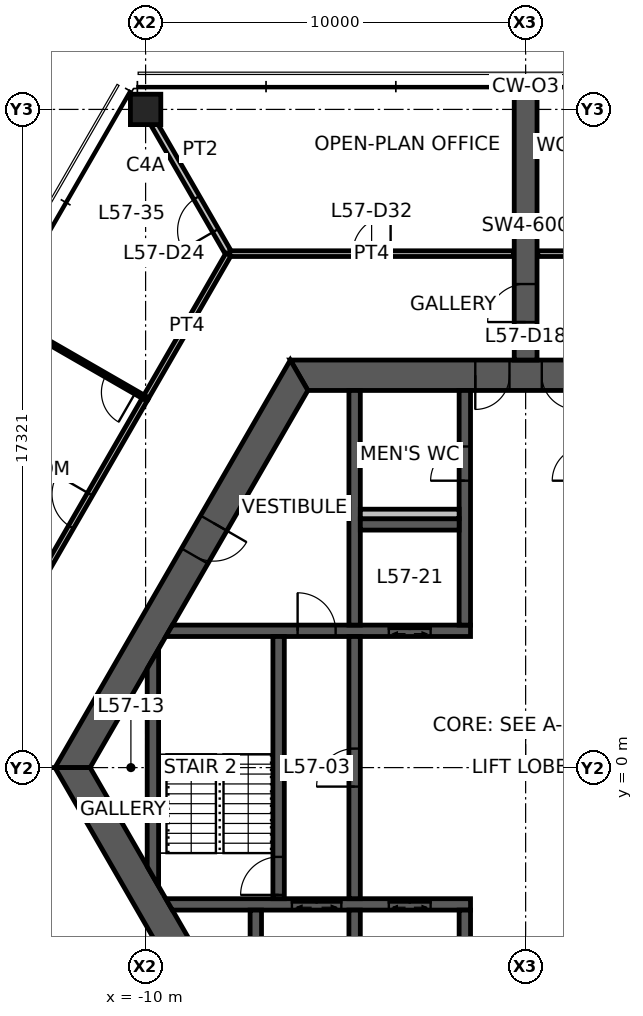
"""IFC4 building model, lengths in metres.
Left out: names, types, materials, properties, quantities, classifications, styles, units other than length and angle.
Written with IfcOpenShell. Run it as: python <this file> out.ifc"""

import sys

from ifc_helpers import new_model, si_unit, direction, frame, frame_2d, origin, origin_2d, place, context, subcontext, project, spatial, polyline, rectangle, hollow_rectangle, outline, extrude, element, fill, save


model = new_model("IFC4")
c1 = context("Model", 3, precision=1e-05, world=origin(), true_north=direction((0.0, 1.0)))
c2 = subcontext(c1, "Body", "Model", "MODEL_VIEW")
j1 = project(units=[si_unit("LENGTHUNIT", "METRE"), si_unit("PLANEANGLEUNIT", "RADIAN")], contexts=[c1])
p1 = place(None, origin())
s1 = spatial("IfcSite", under=j1, at=p1, CompositionType="ELEMENT")
p2 = place(p1, origin())
s2 = spatial("IfcBuilding", under=s1, at=p2, CompositionType="ELEMENT")
p3 = place(p2, frame((0.0, 0.0, 228.4)))
s3 = spatial("IfcBuildingStorey", under=s2, at=p3, CompositionType="ELEMENT", Elevation=228.4)
p4 = place(p3, frame((-10.0, 17.321, 0.0), z_axis=(0.0, 0.0, 1.0), x_axis=(1.0, 0.0, 0.0)))
e1 = element("IfcColumn", 1, at=p4, inside=s3, PredefinedType="COLUMN", context=c2, shape_type="SweptSolid", body=[
    extrude(hollow_rectangle(XDim=0.8, YDim=0.8, WallThickness=0.04, at=origin_2d()), origin(), (0.0, 0.0, 1.0), 3.9),
])
p5 = place(p3, frame((5.961, 10.325, 0.0), z_axis=(0.0, 0.0, 1.0), x_axis=(-1.0, 0.0, 0.0)))
e2 = element("IfcWall", 2, at=p5, inside=s3, PredefinedType="SHEAR", context=c2, shape_type="SweptSolid", body=[
    extrude(outline(polyline([(-0.231, -0.4), (4.636, -0.4), (5.536, -0.4), (6.386, -0.4), (7.286, -0.4), (12.153, -0.4), (11.691, 0.4), (7.286, 0.4), (6.386, 0.4), (5.536, 0.4), (4.636, 0.4), (0.231, 0.4), (-0.231, -0.4)])), origin(), (0.0, 0.0, 1.0), 3.9),
])
p6 = place(p5, frame((6.386, 0.0, 0.0)))
e3 = element("IfcOpeningElement", 3, at=p6, cuts=e2, PredefinedType="OPENING", context=c2, shape_type="SweptSolid", body=[
    extrude(rectangle(XDim=0.9, YDim=2.1, at=frame_2d((0.45, 1.05))), frame((0.0, 0.41, 0.0), z_axis=(0.0, -1.0, 0.0), x_axis=(1.0, 0.0, 0.0)), (0.0, 0.0, 1.0), 0.82),
])
p7 = place(p5, frame((4.636, 0.0, 0.0)))
e4 = element("IfcOpeningElement", 4, at=p7, cuts=e2, PredefinedType="OPENING", context=c2, shape_type="SweptSolid", body=[
    extrude(rectangle(XDim=0.9, YDim=2.1, at=frame_2d((0.45, 1.05))), frame((0.0, 0.41, 0.0), z_axis=(0.0, -1.0, 0.0), x_axis=(1.0, 0.0, 0.0)), (0.0, 0.0, 1.0), 0.82),
])
p8 = place(p3, frame((-5.961, 10.325, 0.0), z_axis=(0.0, 0.0, 1.0), x_axis=(-0.500004296715, -0.866022923061, 0.0)))
e5 = element("IfcWall", 5, at=p8, inside=s3, PredefinedType="SHEAR", context=c2, shape_type="SweptSolid", body=[
    extrude(outline(polyline([(-0.231, -0.4), (4.494, -0.4), (5.494, -0.4), (12.153, -0.4), (11.691, 0.4), (5.494, 0.4), (4.494, 0.4), (0.231, 0.4), (-0.231, -0.4)])), origin(), (0.0, 0.0, 1.0), 3.9),
])
p9 = place(p8, frame((4.494, 0.0, 0.0)))
e6 = element("IfcOpeningElement", 6, at=p9, cuts=e5, PredefinedType="OPENING", context=c2, shape_type="SweptSolid", body=[
    extrude(rectangle(XDim=1.0, YDim=2.1, at=frame_2d((0.5, 1.05))), frame((0.0, 0.41, 0.0), z_axis=(0.0, -1.0, 0.0), x_axis=(1.0, 0.0, 0.0)), (0.0, 0.0, 1.0), 0.82),
])
p10 = place(p3, frame((-11.922, 0.0, 0.0), z_axis=(0.0, 0.0, 1.0), x_axis=(0.500004296715, -0.866022923061, 0.0)))
e7 = element("IfcWall", 7, at=p10, inside=s3, PredefinedType="SHEAR", context=c2, shape_type="SweptSolid", body=[
    extrude(outline(polyline([(-0.231, -0.4), (6.281, -0.4), (7.081, -0.4), (12.153, -0.4), (11.691, 0.4), (7.081, 0.4), (6.281, 0.4), (0.231, 0.4), (-0.231, -0.4)])), origin(), (0.0, 0.0, 1.0), 3.9),
])
p11 = place(p10, frame((6.281, 0.0, 0.0)))
e8 = element("IfcOpeningElement", 8, at=p11, cuts=e7, PredefinedType="OPENING", context=c2, shape_type="SweptSolid", body=[
    extrude(rectangle(XDim=0.8, YDim=2.1, at=frame_2d((0.4, 1.05))), frame((0.0, 0.41, 0.0), z_axis=(0.0, -1.0, 0.0), x_axis=(1.0, 0.0, 0.0)), (0.0, 0.0, 1.0), 0.82),
])
p12 = place(p3, frame((0.0, 10.725, 0.0), z_axis=(0.0, 0.0, 1.0), x_axis=(0.0, 1.0, 0.0)))
e9 = element("IfcWall", 9, at=p12, inside=s3, PredefinedType="SHEAR", context=c2, shape_type="SweptSolid", body=[
    extrude(rectangle(XDim=7.045, YDim=0.6, at=frame_2d((3.523, 0.0))), origin(), (0.0, 0.0, 1.0), 3.9),
])
p13 = place(p12, frame((1.0, 0.0, 0.0)))
e10 = element("IfcOpeningElement", 10, at=p13, cuts=e9, PredefinedType="OPENING", context=c2, shape_type="SweptSolid", body=[
    extrude(rectangle(XDim=1.0, YDim=2.1, at=frame_2d((0.5, 1.05))), frame((0.0, 0.31, 0.0), z_axis=(0.0, -1.0, 0.0), x_axis=(1.0, 0.0, 0.0)), (0.0, 0.0, 1.0), 0.62),
])
p14 = place(p3, frame((-9.382, 3.6, 0.0), z_axis=(0.0, 0.0, 1.0), x_axis=(1.0, 0.0, 0.0)))
e11 = element("IfcWall", 11, at=p14, inside=s3, PredefinedType="SHEAR", context=c2, shape_type="SweptSolid", body=[
    extrude(outline(polyline([(-0.087, -0.15), (3.382, -0.15), (4.382, -0.15), (5.782, -0.15), (6.882, -0.15), (7.932, -0.15), (7.932, 0.15), (6.882, 0.15), (5.782, 0.15), (4.382, 0.15), (3.382, 0.15), (0.087, 0.15), (-0.087, -0.15)])), origin(), (0.0, 0.0, 1.0), 3.9),
])
p15 = place(p14, frame((3.382, 0.0, 0.0)))
e12 = element("IfcOpeningElement", 12, at=p15, cuts=e11, PredefinedType="OPENING", context=c2, shape_type="SweptSolid", body=[
    extrude(rectangle(XDim=1.0, YDim=2.1, at=frame_2d((0.5, 1.05))), frame((0.0, 0.16, 0.0), z_axis=(0.0, -1.0, 0.0), x_axis=(1.0, 0.0, 0.0)), (0.0, 0.0, 1.0), 0.32),
])
p16 = place(p14, frame((5.782, 0.0, 0.0)))
e13 = element("IfcOpeningElement", 13, at=p16, cuts=e11, PredefinedType="OPENING", context=c2, shape_type="SweptSolid", body=[
    extrude(rectangle(XDim=1.1, YDim=2.1, at=frame_2d((0.55, 1.05))), frame((0.0, 0.16, 0.0), z_axis=(0.0, -1.0, 0.0), x_axis=(1.0, 0.0, 0.0)), (0.0, 0.0, 1.0), 0.32),
])
p17 = place(p3, frame((-9.382, -3.6, 0.0), z_axis=(0.0, 0.0, 1.0), x_axis=(1.0, 0.0, 0.0)))
e14 = element("IfcWall", 14, at=p17, inside=s3, PredefinedType="SHEAR", context=c2, shape_type="SweptSolid", body=[
    extrude(outline(polyline([(0.087, -0.15), (3.232, -0.15), (4.532, -0.15), (5.782, -0.15), (6.882, -0.15), (7.932, -0.15), (7.932, 0.15), (6.882, 0.15), (5.782, 0.15), (4.532, 0.15), (3.232, 0.15), (-0.087, 0.15), (0.087, -0.15)])), origin(), (0.0, 0.0, 1.0), 3.9),
])
p18 = place(p17, frame((5.782, 0.0, 0.0)))
e15 = element("IfcOpeningElement", 15, at=p18, cuts=e14, PredefinedType="OPENING", context=c2, shape_type="SweptSolid", body=[
    extrude(rectangle(XDim=1.1, YDim=2.1, at=frame_2d((0.55, 1.05))), frame((0.0, 0.16, 0.0), z_axis=(0.0, -1.0, 0.0), x_axis=(1.0, 0.0, 0.0)), (0.0, 0.0, 1.0), 0.32),
])
p19 = place(p17, frame((3.232, 0.0, 0.0)))
e16 = element("IfcOpeningElement", 16, at=p19, cuts=e14, PredefinedType="OPENING", context=c2, shape_type="SweptSolid", body=[
    extrude(rectangle(XDim=1.3, YDim=2.1, at=frame_2d((0.65, 1.05))), frame((0.0, 0.16, 0.0), z_axis=(0.0, -1.0, 0.0), x_axis=(1.0, 0.0, 0.0)), (0.0, 0.0, 1.0), 0.32),
])
p20 = place(p3, frame((-1.6, 3.75, 0.0), z_axis=(0.0, 0.0, 1.0), x_axis=(0.0, 1.0, 0.0)))
e17 = element("IfcWall", 17, at=p20, inside=s3, PredefinedType="SHEAR", context=c2, shape_type="SweptSolid", body=[
    extrude(rectangle(XDim=6.175, YDim=0.3, at=frame_2d((3.087, 0.0))), origin(), (0.0, 0.0, 1.0), 3.9),
])
p21 = place(p20, frame((3.8, 0.0, 0.0)))
e18 = element("IfcOpeningElement", 18, at=p21, cuts=e17, PredefinedType="OPENING", context=c2, shape_type="SweptSolid", body=[
    extrude(rectangle(XDim=0.9, YDim=2.1, at=frame_2d((0.45, 1.05))), frame((0.0, 0.16, 0.0), z_axis=(0.0, -1.0, 0.0), x_axis=(1.0, 0.0, 0.0)), (0.0, 0.0, 1.0), 0.32),
])
p22 = place(p3, frame((-1.6, -3.75, 0.0), z_axis=(0.0, 0.0, 1.0), x_axis=(0.0, -1.0, 0.0)))
e19 = element("IfcWall", 19, at=p22, inside=s3, PredefinedType="SHEAR", context=c2, shape_type="SweptSolid", body=[
    extrude(rectangle(XDim=6.175, YDim=0.3, at=frame_2d((3.087, 0.0))), origin(), (0.0, 0.0, 1.0), 3.9),
])
p23 = place(p22, frame((3.8, 0.0, 0.0)))
e20 = element("IfcOpeningElement", 20, at=p23, cuts=e19, PredefinedType="OPENING", context=c2, shape_type="SweptSolid", body=[
    extrude(rectangle(XDim=0.9, YDim=2.1, at=frame_2d((0.45, 1.05))), frame((0.0, 0.16, 0.0), z_axis=(0.0, -1.0, 0.0), x_axis=(1.0, 0.0, 0.0)), (0.0, 0.0, 1.0), 0.32),
])
p24 = place(p3, frame((-4.5, -3.45, 0.0), z_axis=(0.0, 0.0, 1.0), x_axis=(0.0, 1.0, 0.0)))
e21 = element("IfcWall", 21, at=p24, inside=s3, PredefinedType="SHEAR", context=c2, shape_type="SweptSolid", body=[
    extrude(rectangle(XDim=6.9, YDim=0.3, at=frame_2d((3.45, 0.0))), origin(), (0.0, 0.0, 1.0), 3.9),
])
p25 = place(p24, frame((2.95, 0.0, 0.0)))
e22 = element("IfcOpeningElement", 22, at=p25, cuts=e21, PredefinedType="OPENING", context=c2, shape_type="SweptSolid", body=[
    extrude(rectangle(XDim=1.0, YDim=2.1, at=frame_2d((0.5, 1.05))), frame((0.0, 0.16, 0.0), z_axis=(0.0, -1.0, 0.0), x_axis=(1.0, 0.0, 0.0)), (0.0, 0.0, 1.0), 0.32),
])
p26 = place(p3, frame((-6.5, -3.45, 0.0), z_axis=(0.0, 0.0, 1.0), x_axis=(0.0, 1.0, 0.0)))
e23 = element("IfcWall", 23, at=p26, inside=s3, PredefinedType="SHEAR", context=c2, shape_type="SweptSolid", body=[
    extrude(rectangle(XDim=6.9, YDim=0.3, at=frame_2d((3.45, 0.0))), origin(), (0.0, 0.0, 1.0), 3.9),
])
p27 = place(p26, frame((0.1, 0.0, 0.0)))
e24 = element("IfcOpeningElement", 24, at=p27, cuts=e23, PredefinedType="OPENING", context=c2, shape_type="SweptSolid", body=[
    extrude(rectangle(XDim=1.0, YDim=2.1, at=frame_2d((0.5, 1.05))), frame((0.0, 0.16, 0.0), z_axis=(0.0, -1.0, 0.0), x_axis=(1.0, 0.0, 0.0)), (0.0, 0.0, 1.0), 0.32),
])
for number, where, z_axis, x_axis in (
    (25, (-4.5, 3.75, 0.0), (0.0, 0.0, 1.0), (0.0, 1.0, 0.0)),
    (26, (-4.5, -3.75, 0.0), (0.0, 0.0, 1.0), (0.0, -1.0, 0.0)),
):
    element("IfcWall", number, at=place(p3, frame(where, z_axis=z_axis, x_axis=x_axis)), inside=s3, PredefinedType="SHEAR", context=c2, shape_type="SweptSolid", body=[
        extrude(rectangle(XDim=6.175, YDim=0.3, at=frame_2d((3.087, 0.0))), origin(), (0.0, 0.0, 1.0), 3.9),
    ])
p28 = place(p3, frame((-4.35, 6.4, 0.0), z_axis=(0.0, 0.0, 1.0), x_axis=(1.0, 0.0, 0.0)))
e27 = element("IfcWall", 27, at=p28, inside=s3, PredefinedType="SHEAR", context=c2, shape_type="SweptSolid", body=[
    extrude(rectangle(XDim=2.6, YDim=0.3, at=frame_2d((1.3, 0.0))), origin(), (0.0, 0.0, 1.0), 3.9),
])
p29 = place(p3, frame((-7.1, -3.75, 0.0), z_axis=(0.0, 0.0, 1.0), x_axis=(0.0, -1.0, 0.0)))
e28 = element("IfcWall", 28, at=p29, inside=s3, PredefinedType="SHEAR", context=c2, shape_type="SweptSolid", body=[
    extrude(rectangle(XDim=3.1, YDim=0.3, at=frame_2d((1.55, 0.0))), origin(), (0.0, 0.0, 1.0), 3.9),
])
p30 = place(p3, frame((-9.808, -2.862, 0.0), z_axis=(0.0, 0.0, 1.0), x_axis=(0.0, 1.0, 0.0)))
e29 = element("IfcWall", 29, at=p30, inside=s3, PredefinedType="SHEAR", context=c2, shape_type="SweptSolid", body=[
    extrude(outline(polyline([(-0.26, -0.15), (5.984, -0.15), (5.465, 0.15), (0.26, 0.15), (-0.26, -0.15)])), origin(), (0.0, 0.0, 1.0), 3.9),
])
p31 = place(p3, frame((-4.35, 6.675, 0.0), z_axis=(0.0, 0.0, 1.0), x_axis=(1.0, 0.0, 0.0)))
e30 = element("IfcWall", 30, at=p31, inside=s3, PredefinedType="PLUMBINGWALL", context=c2, shape_type="SweptSolid", body=[
    extrude(rectangle(XDim=2.6, YDim=0.25, at=frame_2d((1.3, 0.0))), origin(), (0.0, 0.0, 1.0), 3.9),
])
p32 = place(p3, frame((-7.809, 13.525, 0.0), z_axis=(0.0, 0.0, 1.0), x_axis=(-0.499997299682, 0.866026962808, 0.0)))
e31 = element("IfcWall", 31, at=p32, inside=s3, PredefinedType="PARTITIONING", context=c2, shape_type="SweptSolid", body=[
    extrude(rectangle(XDim=4.383, YDim=0.175, at=frame_2d((2.191, 0.0))), origin(), (0.0, 0.0, 1.0), 3.05),
])
p33 = place(p32, frame((0.7, 0.0, 0.0)))
e32 = element("IfcOpeningElement", 32, at=p33, cuts=e31, PredefinedType="OPENING", context=c2, shape_type="SweptSolid", body=[
    extrude(rectangle(XDim=1.0, YDim=2.1, at=frame_2d((0.5, 1.05))), frame((0.0, 0.098, 0.0), z_axis=(0.0, -1.0, 0.0), x_axis=(1.0, 0.0, 0.0)), (0.0, 0.0, 1.0), 0.195),
])
p34 = place(p3, frame((0.32, 13.525, 0.0), z_axis=(0.0, 0.0, 1.0), x_axis=(1.0, 0.0, 0.0)))
e33 = element("IfcWall", 33, at=p34, inside=s3, PredefinedType="PARTITIONING", context=c2, shape_type="SweptSolid", body=[
    extrude(rectangle(XDim=4.15, YDim=0.15, at=frame_2d((2.075, 0.0))), origin(), (0.0, 0.0, 1.0), 2.95),
])
p35 = place(p34, frame((1.575, 0.0, 0.0)))
e34 = element("IfcOpeningElement", 34, at=p35, cuts=e33, PredefinedType="OPENING", context=c2, shape_type="SweptSolid", body=[
    extrude(rectangle(XDim=1.0, YDim=2.1, at=frame_2d((0.5, 1.05))), frame((0.0, 0.085, 0.0), z_axis=(0.0, -1.0, 0.0), x_axis=(1.0, 0.0, 0.0)), (0.0, 0.0, 1.0), 0.17),
])
p36 = place(p3, frame((-7.786, 13.525, 0.0), z_axis=(0.0, 0.0, 1.0), x_axis=(1.0, 0.0, 0.0)))
e35 = element("IfcWall", 35, at=p36, inside=s3, PredefinedType="PARTITIONING", context=c2, shape_type="SweptSolid", body=[
    extrude(rectangle(XDim=7.466, YDim=0.15, at=frame_2d((3.733, 0.0))), origin(), (0.0, 0.0, 1.0), 2.95),
])
p37 = place(p36, frame((3.233, 0.0, 0.0)))
e36 = element("IfcOpeningElement", 36, at=p37, cuts=e35, PredefinedType="OPENING", context=c2, shape_type="SweptSolid", body=[
    extrude(rectangle(XDim=1.0, YDim=2.1, at=frame_2d((0.5, 1.05))), frame((0.0, 0.085, 0.0), z_axis=(0.0, -1.0, 0.0), x_axis=(1.0, 0.0, 0.0)), (0.0, 0.0, 1.0), 0.17),
])
p38 = place(p3, frame((-10.008, 9.716, 0.0), z_axis=(0.0, 0.0, 1.0), x_axis=(0.500004234368, 0.866022959057, 0.0)))
e37 = element("IfcWall", 37, at=p38, inside=s3, PredefinedType="PARTITIONING", context=c2, shape_type="SweptSolid", body=[
    extrude(rectangle(XDim=4.375, YDim=0.15, at=frame_2d((2.188, 0.0))), origin(), (0.0, 0.0, 1.0), 2.95),
])
p39 = place(p3, frame((-11.873, -6.485, 0.0), z_axis=(0.0, 0.0, 1.0), x_axis=(-0.499958760481, 0.866049212123, 0.0)))
e38 = element("IfcWall", 38, at=p39, inside=s3, PredefinedType="PARTITIONING", context=c2, shape_type="SweptSolid", body=[
    extrude(rectangle(XDim=3.1, YDim=0.15, at=frame_2d((1.55, 0.0))), origin(), (0.0, 0.0, 1.0), 2.95),
])
p40 = place(p3, frame((-13.423, 3.801, 0.0), z_axis=(0.0, 0.0, 1.0), x_axis=(0.500020088259, 0.866013805512, 0.0)))
e39 = element("IfcWall", 39, at=p40, inside=s3, PredefinedType="PARTITIONING", context=c2, shape_type="SweptSolid", body=[
    extrude(rectangle(XDim=6.84, YDim=0.15, at=frame_2d((3.42, 0.0))), origin(), (0.0, 0.0, 1.0), 2.95),
])
p41 = place(p40, frame((2.92, 0.0, 0.0)))
e40 = element("IfcOpeningElement", 40, at=p41, cuts=e39, PredefinedType="OPENING", context=c2, shape_type="SweptSolid", body=[
    extrude(rectangle(XDim=1.0, YDim=2.1, at=frame_2d((0.5, 1.05))), frame((0.0, 0.085, 0.0), z_axis=(0.0, -1.0, 0.0), x_axis=(1.0, 0.0, 0.0)), (0.0, 0.0, 1.0), 0.17),
])
p42 = place(p3, frame((-10.003, 9.724, 0.0), z_axis=(0.0, 0.0, 1.0), x_axis=(-0.866566724083, 0.499061231426, 0.0)))
e41 = element("IfcWall", 41, at=p42, inside=s3, PredefinedType="PARTITIONING", context=c2, shape_type="SweptSolid", body=[
    extrude(rectangle(XDim=4.305, YDim=0.1, at=frame_2d((2.153, 0.0))), origin(), (0.0, 0.0, 1.0), 2.95),
])
p43 = place(p42, frame((0.3, 0.0, 0.0)))
e42 = element("IfcOpeningElement", 42, at=p43, cuts=e41, PredefinedType="OPENING", context=c2, shape_type="SweptSolid", body=[
    extrude(rectangle(XDim=0.9, YDim=2.1, at=frame_2d((0.45, 1.05))), frame((0.0, 0.06, 0.0), z_axis=(0.0, -1.0, 0.0), x_axis=(1.0, 0.0, 0.0)), (0.0, 0.0, 1.0), 0.12),
])
p44 = place(p3, frame((0.0, 17.771, 0.0), z_axis=(0.0, 0.0, 1.0), x_axis=(0.0, 1.0, 0.0)))
e43 = element("IfcWall", 43, at=p44, inside=s3, PredefinedType="PARTITIONING", context=c2, shape_type="SweptSolid", body=[
    extrude(rectangle(XDim=0.085, YDim=0.175, at=frame_2d((0.042, 0.0))), origin(), (0.0, 0.0, 1.0), 3.9),
])
p45 = place(p6, origin())
e44 = element("IfcDoor", 44, at=p45, inside=s3, OperationType="SINGLE_SWING_RIGHT", PredefinedType="DOOR", context=c2, shape_type="SweptSolid", body=[
    extrude(rectangle(XDim=0.9, YDim=2.1, at=frame_2d((0.45, 1.05))), frame((0.0, 0.025, 0.0), z_axis=(0.0, -1.0, 0.0), x_axis=(1.0, 0.0, 0.0)), (0.0, 0.0, 1.0), 0.05),
])
fill(e3, e44)
p46 = place(p7, origin())
e45 = element("IfcDoor", 45, at=p46, inside=s3, OperationType="SINGLE_SWING_LEFT", PredefinedType="DOOR", context=c2, shape_type="SweptSolid", body=[
    extrude(rectangle(XDim=0.9, YDim=2.1, at=frame_2d((0.45, 1.05))), frame((0.0, 0.025, 0.0), z_axis=(0.0, -1.0, 0.0), x_axis=(1.0, 0.0, 0.0)), (0.0, 0.0, 1.0), 0.05),
])
fill(e4, e45)
p47 = place(p9, origin())
e46 = element("IfcDoor", 46, at=p47, inside=s3, OperationType="SINGLE_SWING_LEFT", PredefinedType="DOOR", context=c2, shape_type="SweptSolid", body=[
    extrude(rectangle(XDim=1.0, YDim=2.1, at=frame_2d((0.5, 1.05))), frame((0.0, 0.025, 0.0), z_axis=(0.0, -1.0, 0.0), x_axis=(1.0, 0.0, 0.0)), (0.0, 0.0, 1.0), 0.05),
])
fill(e6, e46)
p48 = place(p25, origin())
e47 = element("IfcDoor", 47, at=p48, inside=s3, OperationType="SINGLE_SWING_LEFT", PredefinedType="DOOR", context=c2, shape_type="SweptSolid", body=[
    extrude(rectangle(XDim=1.0, YDim=2.1, at=frame_2d((0.5, 1.05))), frame((0.0, 0.025, 0.0), z_axis=(0.0, -1.0, 0.0), x_axis=(1.0, 0.0, 0.0)), (0.0, 0.0, 1.0), 0.05),
])
fill(e22, e47)
p49 = place(p27, origin())
e48 = element("IfcDoor", 48, at=p49, inside=s3, OperationType="SINGLE_SWING_LEFT", PredefinedType="DOOR", context=c2, shape_type="SweptSolid", body=[
    extrude(rectangle(XDim=1.0, YDim=2.1, at=frame_2d((0.5, 1.05))), frame((0.0, 0.025, 0.0), z_axis=(0.0, -1.0, 0.0), x_axis=(1.0, 0.0, 0.0)), (0.0, 0.0, 1.0), 0.05),
])
fill(e24, e48)
p50 = place(p15, origin())
e49 = element("IfcDoor", 49, at=p50, inside=s3, OperationType="SINGLE_SWING_LEFT", PredefinedType="DOOR", context=c2, shape_type="SweptSolid", body=[
    extrude(rectangle(XDim=1.0, YDim=2.1, at=frame_2d((0.5, 1.05))), frame((0.0, 0.025, 0.0), z_axis=(0.0, -1.0, 0.0), x_axis=(1.0, 0.0, 0.0)), (0.0, 0.0, 1.0), 0.05),
])
fill(e12, e49)
p51 = place(p21, origin())
e50 = element("IfcDoor", 50, at=p51, inside=s3, OperationType="SINGLE_SWING_LEFT", PredefinedType="DOOR", context=c2, shape_type="SweptSolid", body=[
    extrude(rectangle(XDim=0.9, YDim=2.1, at=frame_2d((0.45, 1.05))), frame((0.0, 0.025, 0.0), z_axis=(0.0, -1.0, 0.0), x_axis=(1.0, 0.0, 0.0)), (0.0, 0.0, 1.0), 0.05),
])
fill(e18, e50)
p52 = place(p13, origin())
e51 = element("IfcDoor", 51, at=p52, inside=s3, OperationType="SINGLE_SWING_LEFT", PredefinedType="DOOR", context=c2, shape_type="SweptSolid", body=[
    extrude(rectangle(XDim=1.0, YDim=2.1, at=frame_2d((0.5, 1.05))), frame((0.0, 0.025, 0.0), z_axis=(0.0, -1.0, 0.0), x_axis=(1.0, 0.0, 0.0)), (0.0, 0.0, 1.0), 0.05),
])
fill(e10, e51)
p53 = place(p33, origin())
e52 = element("IfcDoor", 52, at=p53, inside=s3, OperationType="SINGLE_SWING_LEFT", PredefinedType="DOOR", context=c2, shape_type="SweptSolid", body=[
    extrude(rectangle(XDim=1.0, YDim=2.1, at=frame_2d((0.5, 1.05))), frame((0.0, 0.025, 0.0), z_axis=(0.0, -1.0, 0.0), x_axis=(1.0, 0.0, 0.0)), (0.0, 0.0, 1.0), 0.05),
])
fill(e32, e52)
p54 = place(p37, origin())
e53 = element("IfcDoor", 53, at=p54, inside=s3, OperationType="SINGLE_SWING_RIGHT", PredefinedType="DOOR", context=c2, shape_type="SweptSolid", body=[
    extrude(rectangle(XDim=1.0, YDim=2.1, at=frame_2d((0.5, 1.05))), frame((0.0, 0.025, 0.0), z_axis=(0.0, -1.0, 0.0), x_axis=(1.0, 0.0, 0.0)), (0.0, 0.0, 1.0), 0.05),
])
fill(e36, e53)
p55 = place(p41, origin())
e54 = element("IfcDoor", 54, at=p55, inside=s3, OperationType="SINGLE_SWING_RIGHT", PredefinedType="DOOR", context=c2, shape_type="SweptSolid", body=[
    extrude(rectangle(XDim=1.0, YDim=2.1, at=frame_2d((0.5, 1.05))), frame((0.0, 0.025, 0.0), z_axis=(0.0, -1.0, 0.0), x_axis=(1.0, 0.0, 0.0)), (0.0, 0.0, 1.0), 0.05),
])
fill(e40, e54)
p56 = place(p43, origin())
e55 = element("IfcDoor", 55, at=p56, inside=s3, OperationType="SINGLE_SWING_LEFT", PredefinedType="DOOR", context=c2, shape_type="SweptSolid", body=[
    extrude(rectangle(XDim=0.9, YDim=2.1, at=frame_2d((0.45, 1.05))), frame((0.0, 0.025, 0.0), z_axis=(0.0, -1.0, 0.0), x_axis=(1.0, 0.0, 0.0)), (0.0, 0.0, 1.0), 0.05),
])
fill(e42, e55)
p57 = place(p16, origin())
e56 = element("IfcDoor", 56, at=p57, inside=s3, OperationType="DOUBLE_DOOR_SLIDING", PredefinedType="DOOR", context=c2, shape_type="SweptSolid", body=[
    extrude(rectangle(XDim=1.1, YDim=2.1, at=frame_2d((0.55, 1.05))), frame((0.0, 0.025, 0.0), z_axis=(0.0, -1.0, 0.0), x_axis=(1.0, 0.0, 0.0)), (0.0, 0.0, 1.0), 0.05),
])
fill(e13, e56)
p58 = place(p18, origin())
e57 = element("IfcDoor", 57, at=p58, inside=s3, OperationType="DOUBLE_DOOR_SLIDING", PredefinedType="DOOR", context=c2, shape_type="SweptSolid", body=[
    extrude(rectangle(XDim=1.1, YDim=2.1, at=frame_2d((0.55, 1.05))), frame((0.0, 0.025, 0.0), z_axis=(0.0, -1.0, 0.0), x_axis=(1.0, 0.0, 0.0)), (0.0, 0.0, 1.0), 0.05),
])
fill(e15, e57)
p59 = place(p19, origin())
e58 = element("IfcDoor", 58, at=p59, inside=s3, OperationType="DOUBLE_DOOR_SLIDING", PredefinedType="DOOR", context=c2, shape_type="SweptSolid", body=[
    extrude(rectangle(XDim=1.3, YDim=2.1, at=frame_2d((0.65, 1.05))), frame((0.0, 0.025, 0.0), z_axis=(0.0, -1.0, 0.0), x_axis=(1.0, 0.0, 0.0)), (0.0, 0.0, 1.0), 0.05),
])
fill(e16, e58)
save(model, sys.argv[1])
